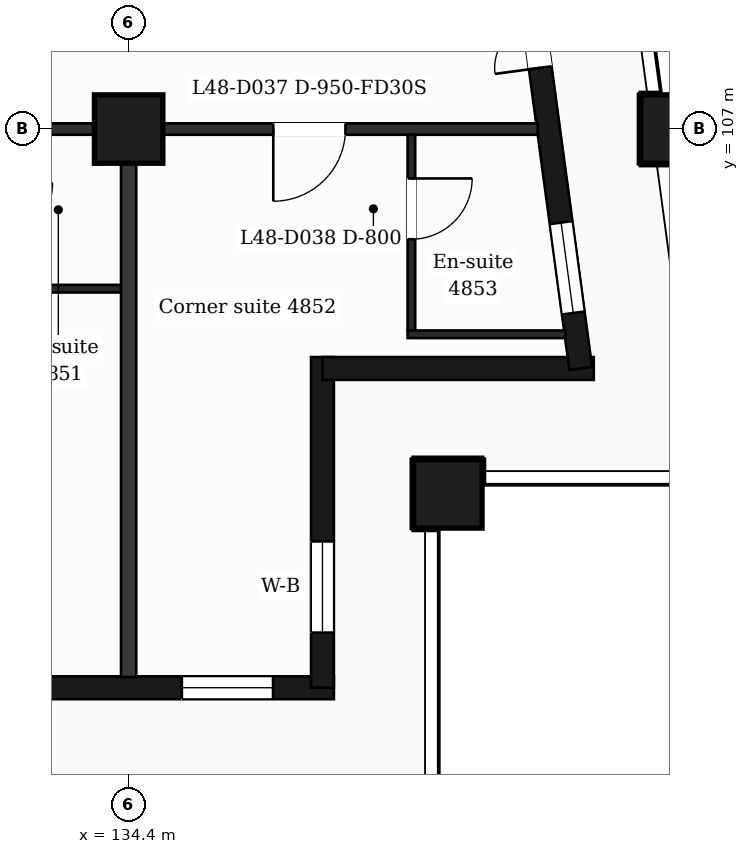
"""IFC4 building model, lengths in metres.
Left out: names, types, materials, properties, quantities, classifications, styles, units other than length and angle.
Written with IfcOpenShell. Run it as: python <this file> out.ifc"""

import sys

from ifc_helpers import new_model, si_unit, direction, frame, frame_2d, origin, origin_2d, place, context, subcontext, project, spatial, rectangle, extrude, element, fill, save


model = new_model("IFC4")
c1 = context("Model", 3, precision=1e-05, world=origin(), true_north=direction((0.0, 1.0)))
c2 = subcontext(c1, "Body", "Model", "MODEL_VIEW")
j1 = project(units=[si_unit("LENGTHUNIT", "METRE"), si_unit("PLANEANGLEUNIT", "RADIAN")], contexts=[c1])
p1 = place(None, origin())
s1 = spatial("IfcSite", under=j1, at=p1, CompositionType="ELEMENT")
p2 = place(p1, origin())
s2 = spatial("IfcBuilding", under=s1, at=p2, CompositionType="ELEMENT")
p3 = place(p2, frame((0.0, 0.0, 202.2)))
s3 = spatial("IfcBuildingStorey", under=s2, at=p3, CompositionType="ELEMENT", Elevation=202.2)
for number, where, z_axis, x_axis in (
    (1, (138.6, 102.2, 0.0), (0.0, 0.0, 1.0), (1.0, 0.0, 0.0)),
    (2, (134.4, 107.0, 0.0), (0.0, 0.0, 1.0), (1.0, 0.0, 0.0)),
    (3, (141.588, 107.0, 0.0), (0.0, 0.0, 1.0), (1.0, 0.0, 0.0)),
):
    element("IfcColumn", number, at=place(p3, frame(where, z_axis=z_axis, x_axis=x_axis)), inside=s3, PredefinedType="COLUMN", context=c2, shape_type="SweptSolid", body=[
        extrude(rectangle(XDim=0.9, YDim=0.9, at=origin_2d()), origin(), (0.0, 0.0, 1.0), 3.7),
    ])
p4 = place(p3, frame((89.85, 99.65, 0.0), z_axis=(0.0, 0.0, 1.0), x_axis=(1.0, 0.0, 0.0)))
e4 = element("IfcWall", 4, at=p4, inside=s3, PredefinedType="SOLIDWALL", context=c2, shape_type="SweptSolid", body=[
    extrude(rectangle(XDim=47.25, YDim=0.3, at=frame_2d((23.625, 0.0))), origin(), (0.0, 0.0, 1.0), 3.38),
])
p5 = place(p4, frame((0.725, 0.0, 0.9)))
e5 = element("IfcOpeningElement", 5, at=p5, cuts=e4, PredefinedType="OPENING", context=c2, shape_type="SweptSolid", body=[
    extrude(rectangle(XDim=1.2, YDim=2.1, at=frame_2d((0.6, 1.05))), frame((0.0, 0.16, 0.0), z_axis=(0.0, -1.0, 0.0), x_axis=(1.0, 0.0, 0.0)), (0.0, 0.0, 1.0), 0.32),
])
p6 = place(p4, frame((3.45, 0.0, 0.9)))
e6 = element("IfcOpeningElement", 6, at=p6, cuts=e4, PredefinedType="OPENING", context=c2, shape_type="SweptSolid", body=[
    extrude(rectangle(XDim=2.4, YDim=2.1, at=frame_2d((1.2, 1.05))), frame((0.0, 0.16, 0.0), z_axis=(0.0, -1.0, 0.0), x_axis=(1.0, 0.0, 0.0)), (0.0, 0.0, 1.0), 0.32),
])
p7 = place(p4, frame((7.65, 0.0, 0.9)))
e7 = element("IfcOpeningElement", 7, at=p7, cuts=e4, PredefinedType="OPENING", context=c2, shape_type="SweptSolid", body=[
    extrude(rectangle(XDim=2.4, YDim=2.1, at=frame_2d((1.2, 1.05))), frame((0.0, 0.16, 0.0), z_axis=(0.0, -1.0, 0.0), x_axis=(1.0, 0.0, 0.0)), (0.0, 0.0, 1.0), 0.32),
])
p8 = place(p4, frame((12.45, 0.0, 0.9)))
e8 = element("IfcOpeningElement", 8, at=p8, cuts=e4, PredefinedType="OPENING", context=c2, shape_type="SweptSolid", body=[
    extrude(rectangle(XDim=1.2, YDim=2.1, at=frame_2d((0.6, 1.05))), frame((0.0, 0.16, 0.0), z_axis=(0.0, -1.0, 0.0), x_axis=(1.0, 0.0, 0.0)), (0.0, 0.0, 1.0), 0.32),
])
p9 = place(p4, frame((16.65, 0.0, 0.9)))
e9 = element("IfcOpeningElement", 9, at=p9, cuts=e4, PredefinedType="OPENING", context=c2, shape_type="SweptSolid", body=[
    extrude(rectangle(XDim=1.2, YDim=2.1, at=frame_2d((0.6, 1.05))), frame((0.0, 0.16, 0.0), z_axis=(0.0, -1.0, 0.0), x_axis=(1.0, 0.0, 0.0)), (0.0, 0.0, 1.0), 0.32),
])
p10 = place(p4, frame((19.95, 0.0, 0.0)))
e10 = element("IfcOpeningElement", 10, at=p10, cuts=e4, PredefinedType="OPENING", context=c2, shape_type="SweptSolid", body=[
    extrude(rectangle(XDim=1.2, YDim=2.4, at=frame_2d((0.6, 1.2))), frame((0.0, 0.16, 0.0), z_axis=(0.0, -1.0, 0.0), x_axis=(1.0, 0.0, 0.0)), (0.0, 0.0, 1.0), 0.32),
])
p11 = place(p4, frame((21.75, 0.0, 0.9)))
e11 = element("IfcOpeningElement", 11, at=p11, cuts=e4, PredefinedType="OPENING", context=c2, shape_type="SweptSolid", body=[
    extrude(rectangle(XDim=1.2, YDim=2.1, at=frame_2d((0.6, 1.05))), frame((0.0, 0.16, 0.0), z_axis=(0.0, -1.0, 0.0), x_axis=(1.0, 0.0, 0.0)), (0.0, 0.0, 1.0), 0.32),
])
p12 = place(p4, frame((24.45, 0.0, 0.9)))
e12 = element("IfcOpeningElement", 12, at=p12, cuts=e4, PredefinedType="OPENING", context=c2, shape_type="SweptSolid", body=[
    extrude(rectangle(XDim=2.4, YDim=2.1, at=frame_2d((1.2, 1.05))), frame((0.0, 0.16, 0.0), z_axis=(0.0, -1.0, 0.0), x_axis=(1.0, 0.0, 0.0)), (0.0, 0.0, 1.0), 0.32),
])
p13 = place(p4, frame((28.35, 0.0, 0.0)))
e13 = element("IfcOpeningElement", 13, at=p13, cuts=e4, PredefinedType="OPENING", context=c2, shape_type="SweptSolid", body=[
    extrude(rectangle(XDim=1.2, YDim=2.4, at=frame_2d((0.6, 1.2))), frame((0.0, 0.16, 0.0), z_axis=(0.0, -1.0, 0.0), x_axis=(1.0, 0.0, 0.0)), (0.0, 0.0, 1.0), 0.32),
])
p14 = place(p4, frame((30.15, 0.0, 0.9)))
e14 = element("IfcOpeningElement", 14, at=p14, cuts=e4, PredefinedType="OPENING", context=c2, shape_type="SweptSolid", body=[
    extrude(rectangle(XDim=1.2, YDim=2.1, at=frame_2d((0.6, 1.05))), frame((0.0, 0.16, 0.0), z_axis=(0.0, -1.0, 0.0), x_axis=(1.0, 0.0, 0.0)), (0.0, 0.0, 1.0), 0.32),
])
p15 = place(p4, frame((32.85, 0.0, 0.9)))
e15 = element("IfcOpeningElement", 15, at=p15, cuts=e4, PredefinedType="OPENING", context=c2, shape_type="SweptSolid", body=[
    extrude(rectangle(XDim=2.4, YDim=2.1, at=frame_2d((1.2, 1.05))), frame((0.0, 0.16, 0.0), z_axis=(0.0, -1.0, 0.0), x_axis=(1.0, 0.0, 0.0)), (0.0, 0.0, 1.0), 0.32),
])
p16 = place(p4, frame((37.05, 0.0, 0.9)))
e16 = element("IfcOpeningElement", 16, at=p16, cuts=e4, PredefinedType="OPENING", context=c2, shape_type="SweptSolid", body=[
    extrude(rectangle(XDim=2.4, YDim=2.1, at=frame_2d((1.2, 1.05))), frame((0.0, 0.16, 0.0), z_axis=(0.0, -1.0, 0.0), x_axis=(1.0, 0.0, 0.0)), (0.0, 0.0, 1.0), 0.32),
])
p17 = place(p4, frame((41.85, 0.0, 0.9)))
e17 = element("IfcOpeningElement", 17, at=p17, cuts=e4, PredefinedType="OPENING", context=c2, shape_type="SweptSolid", body=[
    extrude(rectangle(XDim=1.2, YDim=2.1, at=frame_2d((0.6, 1.05))), frame((0.0, 0.16, 0.0), z_axis=(0.0, -1.0, 0.0), x_axis=(1.0, 0.0, 0.0)), (0.0, 0.0, 1.0), 0.32),
])
p18 = place(p4, frame((45.25, 0.0, 0.9)))
e18 = element("IfcOpeningElement", 18, at=p18, cuts=e4, PredefinedType="OPENING", context=c2, shape_type="SweptSolid", body=[
    extrude(rectangle(XDim=1.2, YDim=2.1, at=frame_2d((0.6, 1.05))), frame((0.0, 0.16, 0.0), z_axis=(0.0, -1.0, 0.0), x_axis=(1.0, 0.0, 0.0)), (0.0, 0.0, 1.0), 0.32),
])
p19 = place(p3, frame((136.95, 99.65, 0.0), z_axis=(0.0, 0.0, 1.0), x_axis=(0.0, 1.0, 0.0)))
e19 = element("IfcWall", 19, at=p19, inside=s3, PredefinedType="SOLIDWALL", context=c2, shape_type="SweptSolid", body=[
    extrude(rectangle(XDim=4.35, YDim=0.3, at=frame_2d((2.175, 0.0))), origin(), (0.0, 0.0, 1.0), 3.38),
])
p20 = place(p19, frame((0.725, 0.0, 0.9)))
e20 = element("IfcOpeningElement", 20, at=p20, cuts=e19, PredefinedType="OPENING", context=c2, shape_type="SweptSolid", body=[
    extrude(rectangle(XDim=1.2, YDim=2.1, at=frame_2d((0.6, 1.05))), frame((0.0, 0.16, 0.0), z_axis=(0.0, -1.0, 0.0), x_axis=(1.0, 0.0, 0.0)), (0.0, 0.0, 1.0), 0.32),
])
p21 = place(p3, frame((136.95, 103.85, 0.0), z_axis=(0.0, 0.0, 1.0), x_axis=(1.0, 0.0, 0.0)))
e21 = element("IfcWall", 21, at=p21, inside=s3, PredefinedType="SOLIDWALL", context=c2, shape_type="SweptSolid", body=[
    extrude(rectangle(XDim=3.569, YDim=0.3, at=frame_2d((1.785, 0.0))), origin(), (0.0, 0.0, 1.0), 3.38),
])
p22 = place(p3, frame((140.348, 103.85, 0.0), z_axis=(0.0, 0.0, 1.0), x_axis=(-0.133431549479, 0.991058031401, 0.0)))
e22 = element("IfcWall", 22, at=p22, inside=s3, PredefinedType="SOLIDWALL", context=c2, shape_type="SweptSolid", body=[
    extrude(rectangle(XDim=6.609, YDim=0.3, at=frame_2d((3.304, 0.0))), origin(), (0.0, 0.0, 1.0), 3.38),
])
p23 = place(p22, frame((0.737, 0.0, 0.9)))
e23 = element("IfcOpeningElement", 23, at=p23, cuts=e22, PredefinedType="OPENING", context=c2, shape_type="SweptSolid", body=[
    extrude(rectangle(XDim=1.2, YDim=2.1, at=frame_2d((0.6, 1.05))), frame((0.0, 0.16, 0.0), z_axis=(0.0, -1.0, 0.0), x_axis=(1.0, 0.0, 0.0)), (0.0, 0.0, 1.0), 0.32),
])
p24 = place(p22, frame((3.991, 0.0, 0.0)))
e24 = element("IfcOpeningElement", 24, at=p24, cuts=e22, PredefinedType="OPENING", context=c2, shape_type="SweptSolid", body=[
    extrude(rectangle(XDim=1.2, YDim=2.4, at=frame_2d((0.6, 1.2))), frame((0.0, 0.16, 0.0), z_axis=(0.0, -1.0, 0.0), x_axis=(1.0, 0.0, 0.0)), (0.0, 0.0, 1.0), 0.32),
])
p25 = place(p3, frame((138.07, 104.3, 0.0), z_axis=(0.0, 0.0, 1.0), x_axis=(1.0, 0.0, 0.0)))
e25 = element("IfcWall", 25, at=p25, inside=s3, PredefinedType="PARTITIONING", context=c2, shape_type="SweptSolid", body=[
    extrude(rectangle(XDim=2.076, YDim=0.1, at=frame_2d((1.038, 0.0))), origin(), (0.0, 0.0, 1.0), 3.38),
])
p26 = place(p3, frame((132.55, 104.9, 0.0), z_axis=(0.0, 0.0, 1.0), x_axis=(1.0, 0.0, 0.0)))
e26 = element("IfcWall", 26, at=p26, inside=s3, PredefinedType="PARTITIONING", context=c2, shape_type="SweptSolid", body=[
    extrude(rectangle(XDim=1.85, YDim=0.1, at=frame_2d((0.925, 0.0))), origin(), (0.0, 0.0, 1.0), 3.38),
])
p27 = place(p3, frame((87.018, 107.0, 0.0), z_axis=(0.0, 0.0, 1.0), x_axis=(1.0, 0.0, 0.0)))
e27 = element("IfcWall", 27, at=p27, inside=s3, PredefinedType="PARTITIONING", context=c2, shape_type="SweptSolid", body=[
    extrude(rectangle(XDim=52.765, YDim=0.15, at=frame_2d((26.382, 0.0))), origin(), (0.0, 0.0, 1.0), 3.38),
])
p28 = place(p27, frame((1.276, 0.0, 0.0)))
e28 = element("IfcOpeningElement", 28, at=p28, cuts=e27, PredefinedType="OPENING", context=c2, shape_type="SweptSolid", body=[
    extrude(rectangle(XDim=0.95, YDim=2.1, at=frame_2d((0.475, 1.05))), frame((0.0, 0.085, 0.0), z_axis=(0.0, -1.0, 0.0), x_axis=(1.0, 0.0, 0.0)), (0.0, 0.0, 1.0), 0.17),
])
p29 = place(p27, frame((6.369, 0.0, 0.0)))
e29 = element("IfcOpeningElement", 29, at=p29, cuts=e27, PredefinedType="OPENING", context=c2, shape_type="SweptSolid", body=[
    extrude(rectangle(XDim=0.95, YDim=2.1, at=frame_2d((0.475, 1.05))), frame((0.0, 0.085, 0.0), z_axis=(0.0, -1.0, 0.0), x_axis=(1.0, 0.0, 0.0)), (0.0, 0.0, 1.0), 0.17),
])
p30 = place(p27, frame((12.112, 0.0, 0.0)))
e30 = element("IfcOpeningElement", 30, at=p30, cuts=e27, PredefinedType="OPENING", context=c2, shape_type="SweptSolid", body=[
    extrude(rectangle(XDim=0.95, YDim=2.1, at=frame_2d((0.475, 1.05))), frame((0.0, 0.085, 0.0), z_axis=(0.0, -1.0, 0.0), x_axis=(1.0, 0.0, 0.0)), (0.0, 0.0, 1.0), 0.17),
])
p31 = place(p27, frame((14.582, 0.0, 0.0)))
e31 = element("IfcOpeningElement", 31, at=p31, cuts=e27, PredefinedType="OPENING", context=c2, shape_type="SweptSolid", body=[
    extrude(rectangle(XDim=0.95, YDim=2.1, at=frame_2d((0.475, 1.05))), frame((0.0, 0.085, 0.0), z_axis=(0.0, -1.0, 0.0), x_axis=(1.0, 0.0, 0.0)), (0.0, 0.0, 1.0), 0.17),
])
p32 = place(p27, frame((20.512, 0.0, 0.0)))
e32 = element("IfcOpeningElement", 32, at=p32, cuts=e27, PredefinedType="OPENING", context=c2, shape_type="SweptSolid", body=[
    extrude(rectangle(XDim=0.95, YDim=2.1, at=frame_2d((0.475, 1.05))), frame((0.0, 0.085, 0.0), z_axis=(0.0, -1.0, 0.0), x_axis=(1.0, 0.0, 0.0)), (0.0, 0.0, 1.0), 0.17),
])
p33 = place(p27, frame((25.157, 0.0, 0.0)))
e33 = element("IfcOpeningElement", 33, at=p33, cuts=e27, PredefinedType="OPENING", context=c2, shape_type="SweptSolid", body=[
    extrude(rectangle(XDim=0.95, YDim=2.1, at=frame_2d((0.475, 1.05))), frame((0.0, 0.085, 0.0), z_axis=(0.0, -1.0, 0.0), x_axis=(1.0, 0.0, 0.0)), (0.0, 0.0, 1.0), 0.17),
])
p34 = place(p27, frame((26.657, 0.0, 0.0)))
e34 = element("IfcOpeningElement", 34, at=p34, cuts=e27, PredefinedType="OPENING", context=c2, shape_type="SweptSolid", body=[
    extrude(rectangle(XDim=0.95, YDim=2.1, at=frame_2d((0.475, 1.05))), frame((0.0, 0.085, 0.0), z_axis=(0.0, -1.0, 0.0), x_axis=(1.0, 0.0, 0.0)), (0.0, 0.0, 1.0), 0.17),
])
p35 = place(p27, frame((31.302, 0.0, 0.0)))
e35 = element("IfcOpeningElement", 35, at=p35, cuts=e27, PredefinedType="OPENING", context=c2, shape_type="SweptSolid", body=[
    extrude(rectangle(XDim=0.95, YDim=2.1, at=frame_2d((0.475, 1.05))), frame((0.0, 0.085, 0.0), z_axis=(0.0, -1.0, 0.0), x_axis=(1.0, 0.0, 0.0)), (0.0, 0.0, 1.0), 0.17),
])
p36 = place(p27, frame((41.207, 0.0, 0.0)))
e36 = element("IfcOpeningElement", 36, at=p36, cuts=e27, PredefinedType="OPENING", context=c2, shape_type="SweptSolid", body=[
    extrude(rectangle(XDim=1.0, YDim=2.1, at=frame_2d((0.5, 1.05))), frame((0.0, 0.085, 0.0), z_axis=(0.0, -1.0, 0.0), x_axis=(1.0, 0.0, 0.0)), (0.0, 0.0, 1.0), 0.17),
])
p37 = place(p27, frame((43.907, 0.0, 0.0)))
e37 = element("IfcOpeningElement", 37, at=p37, cuts=e27, PredefinedType="OPENING", context=c2, shape_type="SweptSolid", body=[
    extrude(rectangle(XDim=0.95, YDim=2.1, at=frame_2d((0.475, 1.05))), frame((0.0, 0.085, 0.0), z_axis=(0.0, -1.0, 0.0), x_axis=(1.0, 0.0, 0.0)), (0.0, 0.0, 1.0), 0.17),
])
p38 = place(p27, frame((49.285, 0.0, 0.0)))
e38 = element("IfcOpeningElement", 38, at=p38, cuts=e27, PredefinedType="OPENING", context=c2, shape_type="SweptSolid", body=[
    extrude(rectangle(XDim=0.95, YDim=2.1, at=frame_2d((0.475, 1.05))), frame((0.0, 0.085, 0.0), z_axis=(0.0, -1.0, 0.0), x_axis=(1.0, 0.0, 0.0)), (0.0, 0.0, 1.0), 0.17),
])
p39 = place(p3, frame((134.4, 99.79, 0.0), z_axis=(0.0, 0.0, 1.0), x_axis=(0.0, 1.0, 0.0)))
e39 = element("IfcWall", 39, at=p39, inside=s3, PredefinedType="PARTITIONING", context=c2, shape_type="SweptSolid", body=[
    extrude(rectangle(XDim=7.135, YDim=0.2, at=frame_2d((3.567, 0.0))), origin(), (0.0, 0.0, 1.0), 3.38),
])
p40 = place(p3, frame((138.12, 104.35, 0.0), z_axis=(0.0, 0.0, 1.0), x_axis=(0.0, 1.0, 0.0)))
e40 = element("IfcWall", 40, at=p40, inside=s3, PredefinedType="PARTITIONING", context=c2, shape_type="SweptSolid", body=[
    extrude(rectangle(XDim=2.575, YDim=0.1, at=frame_2d((1.288, 0.0))), origin(), (0.0, 0.0, 1.0), 3.38),
])
p41 = place(p40, frame((1.2, 0.0, 0.0)))
e41 = element("IfcOpeningElement", 41, at=p41, cuts=e40, PredefinedType="OPENING", context=c2, shape_type="SweptSolid", body=[
    extrude(rectangle(XDim=0.8, YDim=2.1, at=frame_2d((0.4, 1.05))), frame((0.0, 0.06, 0.0), z_axis=(0.0, -1.0, 0.0), x_axis=(1.0, 0.0, 0.0)), (0.0, 0.0, 1.0), 0.12),
])
p42 = place(p18, origin())
e42 = element("IfcWindow", 42, at=p42, inside=s3, PartitioningType="SINGLE_PANEL", PredefinedType="WINDOW", context=c2, shape_type="SweptSolid", body=[
    extrude(rectangle(XDim=1.2, YDim=2.1, at=frame_2d((0.6, 1.05))), frame((0.0, 0.03, 0.0), z_axis=(0.0, -1.0, 0.0), x_axis=(1.0, 0.0, 0.0)), (0.0, 0.0, 1.0), 0.06),
])
fill(e18, e42)
p43 = place(p20, origin())
e43 = element("IfcWindow", 43, at=p43, inside=s3, PartitioningType="SINGLE_PANEL", PredefinedType="WINDOW", context=c2, shape_type="SweptSolid", body=[
    extrude(rectangle(XDim=1.2, YDim=2.1, at=frame_2d((0.6, 1.05))), frame((0.0, 0.03, 0.0), z_axis=(0.0, -1.0, 0.0), x_axis=(1.0, 0.0, 0.0)), (0.0, 0.0, 1.0), 0.06),
])
fill(e20, e43)
p44 = place(p23, origin())
e44 = element("IfcWindow", 44, at=p44, inside=s3, PartitioningType="SINGLE_PANEL", PredefinedType="WINDOW", context=c2, shape_type="SweptSolid", body=[
    extrude(rectangle(XDim=1.2, YDim=2.1, at=frame_2d((0.6, 1.05))), frame((0.0, 0.03, 0.0), z_axis=(0.0, -1.0, 0.0), x_axis=(1.0, 0.0, 0.0)), (0.0, 0.0, 1.0), 0.06),
])
fill(e23, e44)
p45 = place(p24, origin())
e45 = element("IfcDoor", 45, at=p45, inside=s3, OperationType="DOUBLE_DOOR_SINGLE_SWING", PredefinedType="DOOR", context=c2, shape_type="SweptSolid", body=[
    extrude(rectangle(XDim=1.2, YDim=2.4, at=frame_2d((0.6, 1.2))), frame((0.0, 0.025, 0.0), z_axis=(0.0, -1.0, 0.0), x_axis=(1.0, 0.0, 0.0)), (0.0, 0.0, 1.0), 0.05),
])
fill(e24, e45)
p46 = place(p38, origin())
e46 = element("IfcDoor", 46, at=p46, inside=s3, OperationType="SINGLE_SWING_LEFT", PredefinedType="DOOR", context=c2, shape_type="SweptSolid", body=[
    extrude(rectangle(XDim=0.95, YDim=2.1, at=frame_2d((0.475, 1.05))), frame((0.0, 0.025, 0.0), z_axis=(0.0, -1.0, 0.0), x_axis=(1.0, 0.0, 0.0)), (0.0, 0.0, 1.0), 0.05),
])
fill(e38, e46)
p47 = place(p41, origin())
e47 = element("IfcDoor", 47, at=p47, inside=s3, OperationType="SINGLE_SWING_RIGHT", PredefinedType="DOOR", context=c2, shape_type="SweptSolid", body=[
    extrude(rectangle(XDim=0.8, YDim=2.1, at=frame_2d((0.4, 1.05))), frame((0.0, 0.025, 0.0), z_axis=(0.0, -1.0, 0.0), x_axis=(1.0, 0.0, 0.0)), (0.0, 0.0, 1.0), 0.05),
])
fill(e41, e47)
save(model, sys.argv[1])
